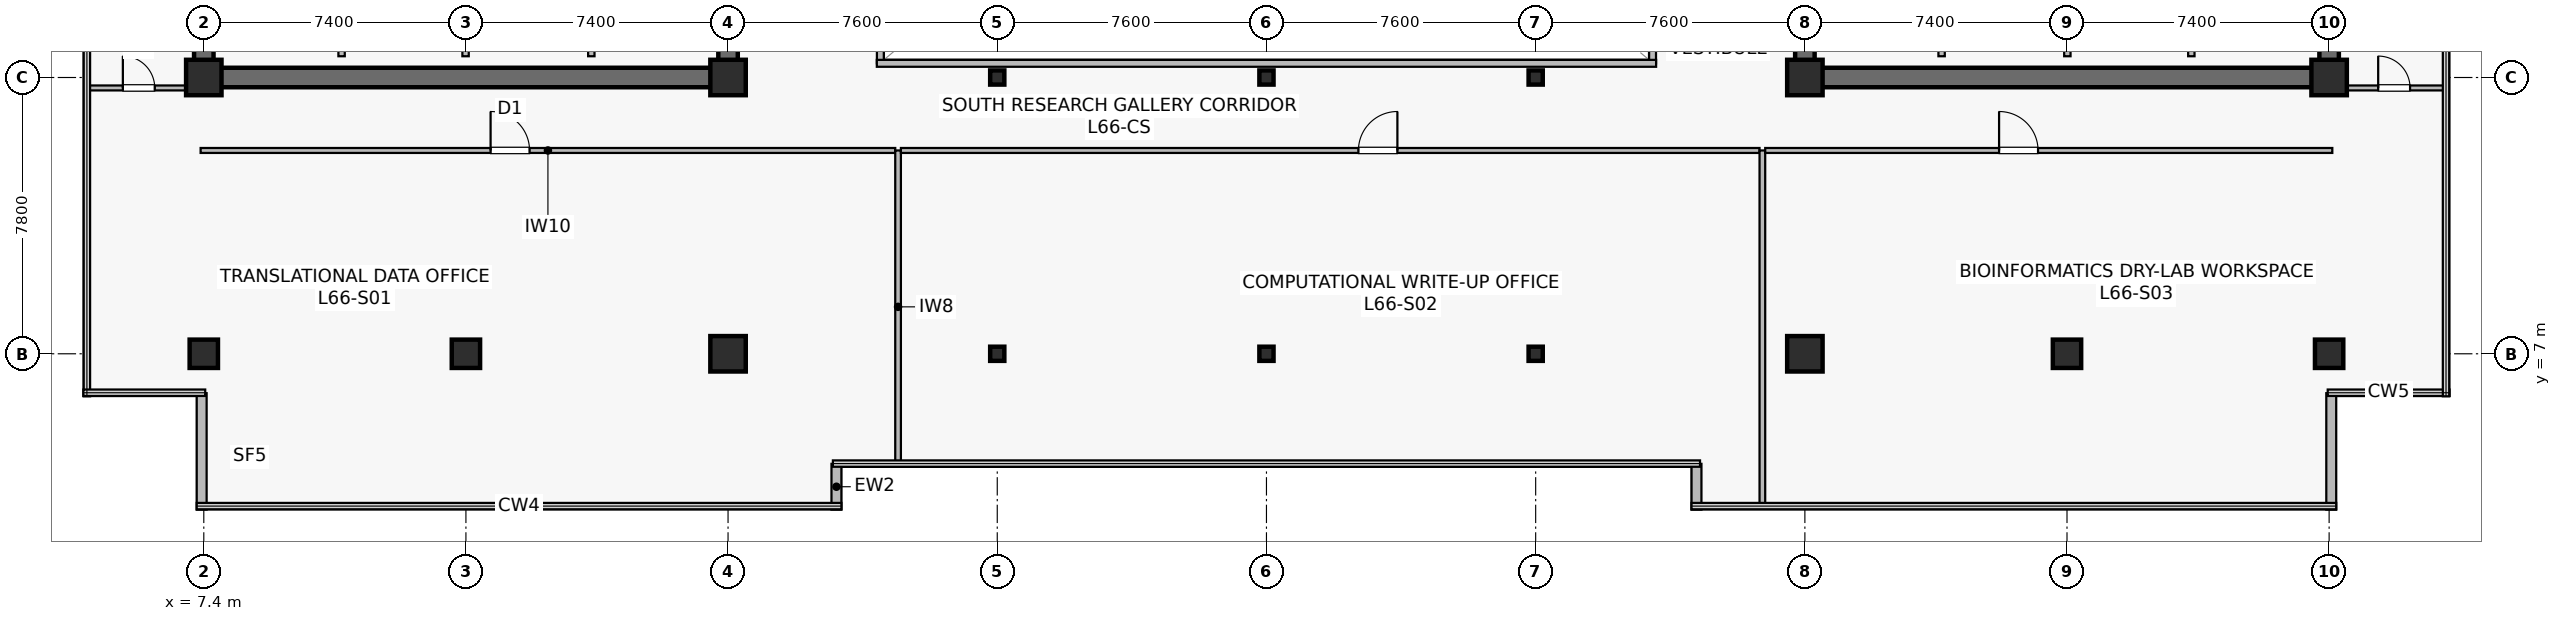
"""IFC4 building model, lengths in metres.
Left out: names, types, materials, properties, quantities, classifications, styles, units other than length and angle.
Written with IfcOpenShell. Run it as: python <this file> out.ifc"""

import sys

from ifc_helpers import new_model, si_unit, direction, frame, frame_2d, origin, origin_2d, place, context, subcontext, project, spatial, rectangle, hollow_rectangle, extrude, source, transform, mapped, element, fill, save


model = new_model("IFC4")
c1 = context("Model", 3, precision=1e-05, world=origin(), true_north=direction((0.0, 1.0)))
c2 = subcontext(c1, "Body", "Model", "MODEL_VIEW")
j1 = project(units=[si_unit("LENGTHUNIT", "METRE"), si_unit("PLANEANGLEUNIT", "RADIAN")], contexts=[c1])
p1 = place(None, origin())
s1 = spatial("IfcSite", under=j1, at=p1, CompositionType="ELEMENT")
p2 = place(p1, origin())
s2 = spatial("IfcBuilding", under=s1, at=p2, CompositionType="ELEMENT")
p3 = place(p2, frame((0.0, 0.0, 275.2)))
s3 = spatial("IfcBuildingStorey", under=s2, at=p3, CompositionType="ELEMENT", Elevation=275.2)
p4 = place(p3, frame((7.125, 14.8, 0.0), z_axis=(0.0, 0.0, 1.0), x_axis=(1.0, 0.0, 0.0)))
e1 = element("IfcWall", 1, at=p4, inside=s3, PredefinedType="SHEAR", context=c2, shape_type="SweptSolid", body=[
    extrude(rectangle(XDim=15.35, YDim=0.55, at=frame_2d((7.675, 0.0))), origin(), (0.0, 0.0, 1.0), 3.8),
])
p5 = place(p3, frame((7.4, 15.075, 0.0), z_axis=(0.0, 0.0, 1.0), x_axis=(0.0, 1.0, 0.0)))
e2 = element("IfcWall", 2, at=p5, inside=s3, PredefinedType="SHEAR", context=c2, shape_type="SweptSolid", body=[
    extrude(rectangle(XDim=18.45, YDim=0.55, at=frame_2d((9.225, 0.0))), origin(), (0.0, 0.0, 1.0), 3.8),
])
p6 = place(p3, frame((22.2, 15.075, 0.0), z_axis=(0.0, 0.0, 1.0), x_axis=(0.0, 1.0, 0.0)))
e3 = element("IfcWall", 3, at=p6, inside=s3, PredefinedType="SHEAR", context=c2, shape_type="SweptSolid", body=[
    extrude(rectangle(XDim=18.45, YDim=0.55, at=frame_2d((9.225, 0.0))), origin(), (0.0, 0.0, 1.0), 3.8),
])
p7 = place(p6, frame((3.475, 0.0, 0.0)))
e4 = element("IfcOpeningElement", 4, at=p7, cuts=e3, PredefinedType="OPENING", context=c2, shape_type="SweptSolid", body=[
    extrude(rectangle(XDim=1.42, YDim=2.2, at=frame_2d((0.71, 1.1))), frame((0.0, 0.285, 0.0), z_axis=(0.0, -1.0, 0.0), x_axis=(1.0, 0.0, 0.0)), (0.0, 0.0, 1.0), 0.57),
])
p8 = place(p3, frame((52.325, 14.8, 0.0), z_axis=(0.0, 0.0, 1.0), x_axis=(1.0, 0.0, 0.0)))
e5 = element("IfcWall", 5, at=p8, inside=s3, PredefinedType="SHEAR", context=c2, shape_type="SweptSolid", body=[
    extrude(rectangle(XDim=15.35, YDim=0.55, at=frame_2d((7.675, 0.0))), origin(), (0.0, 0.0, 1.0), 3.8),
])
p9 = place(p3, frame((52.6, 15.075, 0.0), z_axis=(0.0, 0.0, 1.0), x_axis=(0.0, 1.0, 0.0)))
e6 = element("IfcWall", 6, at=p9, inside=s3, PredefinedType="SHEAR", context=c2, shape_type="SweptSolid", body=[
    extrude(rectangle(XDim=18.45, YDim=0.55, at=frame_2d((9.225, 0.0))), origin(), (0.0, 0.0, 1.0), 3.8),
])
p10 = place(p9, frame((3.475, 0.0, 0.0)))
e7 = element("IfcOpeningElement", 7, at=p10, cuts=e6, PredefinedType="OPENING", context=c2, shape_type="SweptSolid", body=[
    extrude(rectangle(XDim=1.42, YDim=2.2, at=frame_2d((0.71, 1.1))), frame((0.0, 0.285, 0.0), z_axis=(0.0, -1.0, 0.0), x_axis=(1.0, 0.0, 0.0)), (0.0, 0.0, 1.0), 0.57),
])
p11 = place(p3, frame((67.4, 15.075, 0.0), z_axis=(0.0, 0.0, 1.0), x_axis=(0.0, 1.0, 0.0)))
e8 = element("IfcWall", 8, at=p11, inside=s3, PredefinedType="SHEAR", context=c2, shape_type="SweptSolid", body=[
    extrude(rectangle(XDim=18.45, YDim=0.55, at=frame_2d((9.225, 0.0))), origin(), (0.0, 0.0, 1.0), 3.8),
])
m1 = source(origin(), c2, "Body", "SweptSolid", [
    extrude(rectangle(XDim=0.8, YDim=0.8, at=origin_2d()), origin(), (0.0, 0.0, 1.0), 4.1),
])
p12 = place(p3, frame((14.8, 7.0, 0.0), z_axis=(0.0, 0.0, 1.0), x_axis=(1.0, 0.0, 0.0)))
e9 = element("IfcColumn", 9, at=p12, inside=s3, PredefinedType="COLUMN", context=c2, shape_type="MappedRepresentation", body=[
    mapped(m1, transform((0.0, 0.0, 0.0), scale=1.0)),
])
m2 = source(origin(), c2, "Body", "SweptSolid", [
    extrude(rectangle(XDim=1.0, YDim=1.0, at=origin_2d()), origin(), (0.0, 0.0, 1.0), 4.1),
])
for number, where, z_axis, x_axis in (
    (10, (22.2, 7.0, 0.0), (0.0, 0.0, 1.0), (1.0, 0.0, 0.0)),
    (11, (7.4, 14.8, 0.0), (0.0, 0.0, 1.0), (1.0, 0.0, 0.0)),
    (12, (22.2, 14.8, 0.0), (0.0, 0.0, 1.0), (1.0, 0.0, 0.0)),
    (13, (52.6, 7.0, 0.0), (0.0, 0.0, 1.0), (1.0, 0.0, 0.0)),
):
    element("IfcColumn", number, at=place(p3, frame(where, z_axis=z_axis, x_axis=x_axis)), inside=s3, PredefinedType="COLUMN", context=c2, shape_type="MappedRepresentation", body=[
        mapped(m2, transform((0.0, 0.0, 0.0), scale=1.0)),
    ])
p13 = place(p3, frame((60.0, 7.0, 0.0), z_axis=(0.0, 0.0, 1.0), x_axis=(1.0, 0.0, 0.0)))
e14 = element("IfcColumn", 14, at=p13, inside=s3, PredefinedType="COLUMN", context=c2, shape_type="MappedRepresentation", body=[
    mapped(m1, transform((0.0, 0.0, 0.0), scale=1.0)),
])
for number, where, z_axis, x_axis in (
    (15, (52.6, 14.8, 0.0), (0.0, 0.0, 1.0), (1.0, 0.0, 0.0)),
    (16, (67.4, 14.8, 0.0), (0.0, 0.0, 1.0), (1.0, 0.0, 0.0)),
):
    element("IfcColumn", number, at=place(p3, frame(where, z_axis=z_axis, x_axis=x_axis)), inside=s3, PredefinedType="COLUMN", context=c2, shape_type="MappedRepresentation", body=[
        mapped(m2, transform((0.0, 0.0, 0.0), scale=1.0)),
    ])
for number, where, z_axis, x_axis in (
    (17, (7.4, 7.0, 0.0), (0.0, 0.0, 1.0), (1.0, 0.0, 0.0)),
    (18, (67.4, 7.0, 0.0), (0.0, 0.0, 1.0), (1.0, 0.0, 0.0)),
):
    element("IfcColumn", number, at=place(p3, frame(where, z_axis=z_axis, x_axis=x_axis)), inside=s3, PredefinedType="COLUMN", context=c2, shape_type="MappedRepresentation", body=[
        mapped(m1, transform((0.0, 0.0, 0.0), scale=1.0)),
    ])
m3 = source(origin(), c2, "Body", "SweptSolid", [
    extrude(hollow_rectangle(XDim=0.4, YDim=0.4, WallThickness=0.019, at=origin_2d()), origin(), (0.0, 0.0, 1.0), 4.1),
])
for number, where, z_axis, x_axis in (
    (19, (29.8, 7.0, 0.0), (0.0, 0.0, 1.0), (1.0, 0.0, 0.0)),
    (20, (29.8, 14.8, 0.0), (0.0, 0.0, 1.0), (1.0, 0.0, 0.0)),
    (21, (37.4, 7.0, 0.0), (0.0, 0.0, 1.0), (1.0, 0.0, 0.0)),
    (22, (37.4, 14.8, 0.0), (0.0, 0.0, 1.0), (1.0, 0.0, 0.0)),
    (23, (45.0, 7.0, 0.0), (0.0, 0.0, 1.0), (1.0, 0.0, 0.0)),
    (24, (45.0, 14.8, 0.0), (0.0, 0.0, 1.0), (1.0, 0.0, 0.0)),
):
    element("IfcColumn", number, at=place(p3, frame(where, z_axis=z_axis, x_axis=x_axis)), inside=s3, PredefinedType="COLUMN", context=c2, shape_type="MappedRepresentation", body=[
        mapped(m3, transform((0.0, 0.0, 0.0), scale=1.0)),
    ])
for number, where, z_axis, x_axis in (
    (25, (25.26, 2.6, 0.0), (0.0, 0.0, 1.0), (0.0, 1.0, 0.0)),
    (26, (49.54, 3.893, 0.0), (0.0, 0.0, 1.0), (0.0, -1.0, 0.0)),
):
    element("IfcWall", number, at=place(p3, frame(where, z_axis=z_axis, x_axis=x_axis)), inside=s3, PredefinedType="STANDARD", context=c2, shape_type="SweptSolid", body=[
        extrude(rectangle(XDim=1.293, YDim=0.28, at=frame_2d((0.646, 0.0))), origin(), (0.0, 0.0, 1.0), 3.8),
    ])
for number, where, z_axis, x_axis in (
    (27, (67.46, 2.6, 0.0), (0.0, 0.0, 1.0), (0.0, 1.0, 0.0)),
    (28, (7.34, 5.888, 0.0), (0.0, 0.0, 1.0), (0.0, -1.0, 0.0)),
):
    element("IfcWall", number, at=place(p3, frame(where, z_axis=z_axis, x_axis=x_axis)), inside=s3, PredefinedType="STANDARD", context=c2, shape_type="SweptSolid", body=[
        extrude(rectangle(XDim=3.288, YDim=0.28, at=frame_2d((1.644, 0.0))), origin(), (0.0, 0.0, 1.0), 3.8),
    ])
p14 = place(p3, frame((11.29, 15.4, 0.0), z_axis=(0.0, 0.0, 1.0), x_axis=(0.0, 1.0, 0.0)))
e29 = element("IfcWall", 29, at=p14, inside=s3, PredefinedType="SOLIDWALL", context=c2, shape_type="SweptSolid", body=[
    extrude(rectangle(XDim=2.4, YDim=0.18, at=frame_2d((1.2, 0.0))), origin(), (0.0, 0.0, 1.0), 3.8),
])
p15 = place(p3, frame((14.79, 15.4, 0.0), z_axis=(0.0, 0.0, 1.0), x_axis=(0.0, 1.0, 0.0)))
e30 = element("IfcWall", 30, at=p15, inside=s3, PredefinedType="SOLIDWALL", context=c2, shape_type="SweptSolid", body=[
    extrude(rectangle(XDim=2.4, YDim=0.18, at=frame_2d((1.2, 0.0))), origin(), (0.0, 0.0, 1.0), 3.197),
])
for number, where, z_axis, x_axis in (
    (31, (18.34, 15.4, 0.0), (0.0, 0.0, 1.0), (0.0, 1.0, 0.0)),
    (32, (63.51, 15.4, 0.0), (0.0, 0.0, 1.0), (0.0, 1.0, 0.0)),
):
    element("IfcWall", number, at=place(p3, frame(where, z_axis=z_axis, x_axis=x_axis)), inside=s3, PredefinedType="SOLIDWALL", context=c2, shape_type="SweptSolid", body=[
        extrude(rectangle(XDim=2.4, YDim=0.18, at=frame_2d((1.2, 0.0))), origin(), (0.0, 0.0, 1.0), 3.8),
    ])
p16 = place(p3, frame((60.01, 15.4, 0.0), z_axis=(0.0, 0.0, 1.0), x_axis=(0.0, 1.0, 0.0)))
e33 = element("IfcWall", 33, at=p16, inside=s3, PredefinedType="SOLIDWALL", context=c2, shape_type="SweptSolid", body=[
    extrude(rectangle(XDim=2.4, YDim=0.18, at=frame_2d((1.2, 0.0))), origin(), (0.0, 0.0, 1.0), 3.197),
])
p17 = place(p3, frame((56.46, 15.4, 0.0), z_axis=(0.0, 0.0, 1.0), x_axis=(0.0, 1.0, 0.0)))
e34 = element("IfcWall", 34, at=p17, inside=s3, PredefinedType="SOLIDWALL", context=c2, shape_type="SweptSolid", body=[
    extrude(rectangle(XDim=2.4, YDim=0.18, at=frame_2d((1.2, 0.0))), origin(), (0.0, 0.0, 1.0), 3.8),
])
p18 = place(p3, frame((26.5, 15.2, 0.0), z_axis=(0.0, 0.0, 1.0), x_axis=(0.0, 1.0, 0.0)))
e35 = element("IfcWall", 35, at=p18, inside=s3, PredefinedType="SOLIDWALL", context=c2, shape_type="SweptSolid", body=[
    extrude(rectangle(XDim=18.2, YDim=0.195, at=frame_2d((9.1, 0.0))), origin(), (0.0, 0.0, 1.0), 3.8),
])
p19 = place(p18, frame((1.8, 0.0, 0.9)))
e36 = element("IfcOpeningElement", 36, at=p19, cuts=e35, PredefinedType="OPENING", context=c2, shape_type="SweptSolid", body=[
    extrude(rectangle(XDim=1.5, YDim=1.4, at=frame_2d((0.75, 0.7))), frame((0.0, 0.107, 0.0), z_axis=(0.0, -1.0, 0.0), x_axis=(1.0, 0.0, 0.0)), (0.0, 0.0, 1.0), 0.215),
])
p20 = place(p18, frame((13.2, 0.0, 0.9)))
e37 = element("IfcOpeningElement", 37, at=p20, cuts=e35, PredefinedType="OPENING", context=c2, shape_type="SweptSolid", body=[
    extrude(rectangle(XDim=1.5, YDim=1.4, at=frame_2d((0.75, 0.7))), frame((0.0, 0.107, 0.0), z_axis=(0.0, -1.0, 0.0), x_axis=(1.0, 0.0, 0.0)), (0.0, 0.0, 1.0), 0.215),
])
p21 = place(p3, frame((48.3, 15.2, 0.0), z_axis=(0.0, 0.0, 1.0), x_axis=(0.0, 1.0, 0.0)))
e38 = element("IfcWall", 38, at=p21, inside=s3, PredefinedType="SOLIDWALL", context=c2, shape_type="SweptSolid", body=[
    extrude(rectangle(XDim=18.2, YDim=0.195, at=frame_2d((9.1, 0.0))), origin(), (0.0, 0.0, 1.0), 3.8),
])
p22 = place(p21, frame((1.8, 0.0, 0.9)))
e39 = element("IfcOpeningElement", 39, at=p22, cuts=e38, PredefinedType="OPENING", context=c2, shape_type="SweptSolid", body=[
    extrude(rectangle(XDim=1.5, YDim=1.4, at=frame_2d((0.75, 0.7))), frame((0.0, 0.107, 0.0), z_axis=(0.0, -1.0, 0.0), x_axis=(1.0, 0.0, 0.0)), (0.0, 0.0, 1.0), 0.215),
])
p23 = place(p21, frame((13.2, 0.0, 0.9)))
e40 = element("IfcOpeningElement", 40, at=p23, cuts=e38, PredefinedType="OPENING", context=c2, shape_type="SweptSolid", body=[
    extrude(rectangle(XDim=1.5, YDim=1.4, at=frame_2d((0.75, 0.7))), frame((0.0, 0.107, 0.0), z_axis=(0.0, -1.0, 0.0), x_axis=(1.0, 0.0, 0.0)), (0.0, 0.0, 1.0), 0.215),
])
p24 = place(p3, frame((26.4, 15.2, 0.0), z_axis=(0.0, 0.0, 1.0), x_axis=(1.0, 0.0, 0.0)))
e41 = element("IfcWall", 41, at=p24, inside=s3, PredefinedType="SOLIDWALL", context=c2, shape_type="SweptSolid", body=[
    extrude(rectangle(XDim=22.0, YDim=0.195, at=frame_2d((11.0, 0.0))), origin(), (0.0, 0.0, 1.0), 3.8),
])
p25 = place(p3, frame((7.31, 12.74, 0.0), z_axis=(0.0, 0.0, 1.0), x_axis=(1.0, 0.0, 0.0)))
e42 = element("IfcWall", 42, at=p25, inside=s3, PredefinedType="PARTITIONING", context=c2, shape_type="SweptSolid", body=[
    extrude(rectangle(XDim=19.61, YDim=0.14, at=frame_2d((9.805, 0.0))), origin(), (0.0, 0.0, 1.0), 3.197),
])
p26 = place(p25, frame((8.186, 0.0, 0.0)))
e43 = element("IfcOpeningElement", 43, at=p26, cuts=e42, PredefinedType="OPENING", context=c2, shape_type="SweptSolid", body=[
    extrude(rectangle(XDim=1.1, YDim=2.18, at=frame_2d((0.55, 1.09))), frame((0.0, 0.08, 0.0), z_axis=(0.0, -1.0, 0.0), x_axis=(1.0, 0.0, 0.0)), (0.0, 0.0, 1.0), 0.16),
])
p27 = place(p3, frame((27.0, 3.91, 0.0), z_axis=(0.0, 0.0, 1.0), x_axis=(0.0, 1.0, 0.0)))
e44 = element("IfcWall", 44, at=p27, inside=s3, PredefinedType="PARTITIONING", context=c2, shape_type="SweptSolid", body=[
    extrude(rectangle(XDim=8.83, YDim=0.16, at=frame_2d((4.415, 0.0))), origin(), (0.0, 0.0, 1.0), 3.135),
])
p28 = place(p3, frame((27.08, 12.74, 0.0), z_axis=(0.0, 0.0, 1.0), x_axis=(1.0, 0.0, 0.0)))
e45 = element("IfcWall", 45, at=p28, inside=s3, PredefinedType="PARTITIONING", context=c2, shape_type="SweptSolid", body=[
    extrude(rectangle(XDim=24.24, YDim=0.14, at=frame_2d((12.12, 0.0))), origin(), (0.0, 0.0, 1.0), 3.197),
])
p29 = place(p28, frame((12.917, 0.0, 0.0)))
e46 = element("IfcOpeningElement", 46, at=p29, cuts=e45, PredefinedType="OPENING", context=c2, shape_type="SweptSolid", body=[
    extrude(rectangle(XDim=1.1, YDim=2.18, at=frame_2d((0.55, 1.09))), frame((0.0, 0.08, 0.0), z_axis=(0.0, -1.0, 0.0), x_axis=(1.0, 0.0, 0.0)), (0.0, 0.0, 1.0), 0.16),
])
p30 = place(p3, frame((51.4, 2.71, 0.0), z_axis=(0.0, 0.0, 1.0), x_axis=(0.0, 1.0, 0.0)))
e47 = element("IfcWall", 47, at=p30, inside=s3, PredefinedType="PARTITIONING", context=c2, shape_type="SweptSolid", body=[
    extrude(rectangle(XDim=10.03, YDim=0.16, at=frame_2d((5.015, 0.0))), origin(), (0.0, 0.0, 1.0), 3.135),
])
p31 = place(p3, frame((51.48, 12.74, 0.0), z_axis=(0.0, 0.0, 1.0), x_axis=(1.0, 0.0, 0.0)))
e48 = element("IfcWall", 48, at=p31, inside=s3, PredefinedType="PARTITIONING", context=c2, shape_type="SweptSolid", body=[
    extrude(rectangle(XDim=16.01, YDim=0.14, at=frame_2d((8.005, 0.0))), origin(), (0.0, 0.0, 1.0), 3.197),
])
p32 = place(p31, frame((6.602, 0.0, 0.0)))
e49 = element("IfcOpeningElement", 49, at=p32, cuts=e48, PredefinedType="OPENING", context=c2, shape_type="SweptSolid", body=[
    extrude(rectangle(XDim=1.1, YDim=2.18, at=frame_2d((0.55, 1.09))), frame((0.0, 0.08, 0.0), z_axis=(0.0, -1.0, 0.0), x_axis=(1.0, 0.0, 0.0)), (0.0, 0.0, 1.0), 0.16),
])
p33 = place(p3, frame((4.11, 14.505, 0.0), z_axis=(0.0, 0.0, 1.0), x_axis=(1.0, 0.0, 0.0)))
e50 = element("IfcWall", 50, at=p33, inside=s3, PredefinedType="PARTITIONING", context=c2, shape_type="SweptSolid", body=[
    extrude(rectangle(XDim=2.91, YDim=0.14, at=frame_2d((1.455, 0.0))), origin(), (0.0, 0.0, 1.0), 3.8),
])
p34 = place(p33, frame((1.005, 0.0, 0.0)))
e51 = element("IfcOpeningElement", 51, at=p34, cuts=e50, PredefinedType="OPENING", context=c2, shape_type="SweptSolid", body=[
    extrude(rectangle(XDim=0.9, YDim=2.1, at=frame_2d((0.45, 1.05))), frame((0.0, 0.08, 0.0), z_axis=(0.0, -1.0, 0.0), x_axis=(1.0, 0.0, 0.0)), (0.0, 0.0, 1.0), 0.16),
])
p35 = place(p3, frame((67.78, 14.505, 0.0), z_axis=(0.0, 0.0, 1.0), x_axis=(1.0, 0.0, 0.0)))
e52 = element("IfcWall", 52, at=p35, inside=s3, PredefinedType="PARTITIONING", context=c2, shape_type="SweptSolid", body=[
    extrude(rectangle(XDim=2.91, YDim=0.14, at=frame_2d((1.455, 0.0))), origin(), (0.0, 0.0, 1.0), 3.8),
])
p36 = place(p35, frame((1.005, 0.0, 0.0)))
e53 = element("IfcOpeningElement", 53, at=p36, cuts=e52, PredefinedType="OPENING", context=c2, shape_type="SweptSolid", body=[
    extrude(rectangle(XDim=0.9, YDim=2.1, at=frame_2d((0.45, 1.05))), frame((0.0, 0.08, 0.0), z_axis=(0.0, -1.0, 0.0), x_axis=(1.0, 0.0, 0.0)), (0.0, 0.0, 1.0), 0.16),
])
m4 = source(origin(), c2, "Body", "SweptSolid", [
    extrude(rectangle(XDim=1.1, YDim=2.18, at=frame_2d((0.55, 1.09))), frame((0.0, 0.025, 0.0), z_axis=(0.0, -1.0, 0.0), x_axis=(1.0, 0.0, 0.0)), (0.0, 0.0, 1.0), 0.05),
])
p37 = place(p26, origin())
e54 = element("IfcDoor", 54, at=p37, inside=s3, OperationType="SINGLE_SWING_LEFT", PredefinedType="DOOR", context=c2, shape_type="MappedRepresentation", body=[
    mapped(m4, transform((0.0, 0.0, 0.0), scale=1.0)),
])
fill(e43, e54)
p38 = place(p29, origin())
e55 = element("IfcDoor", 55, at=p38, inside=s3, OperationType="SINGLE_SWING_RIGHT", PredefinedType="DOOR", context=c2, shape_type="MappedRepresentation", body=[
    mapped(m4, transform((0.0, 0.0, 0.0), scale=1.0)),
])
fill(e46, e55)
p39 = place(p32, origin())
e56 = element("IfcDoor", 56, at=p39, inside=s3, OperationType="SINGLE_SWING_LEFT", PredefinedType="DOOR", context=c2, shape_type="MappedRepresentation", body=[
    mapped(m4, transform((0.0, 0.0, 0.0), scale=1.0)),
])
fill(e49, e56)
m5 = source(origin(), c2, "Body", "SweptSolid", [
    extrude(rectangle(XDim=0.9, YDim=2.1, at=frame_2d((0.45, 1.05))), frame((0.0, 0.025, 0.0), z_axis=(0.0, -1.0, 0.0), x_axis=(1.0, 0.0, 0.0)), (0.0, 0.0, 1.0), 0.05),
])
p40 = place(p34, origin())
e57 = element("IfcDoor", 57, at=p40, inside=s3, OperationType="SINGLE_SWING_LEFT", PredefinedType="DOOR", context=c2, shape_type="MappedRepresentation", body=[
    mapped(m5, transform((0.0, 0.0, 0.0), scale=1.0)),
])
fill(e51, e57)
p41 = place(p36, origin())
e58 = element("IfcDoor", 58, at=p41, inside=s3, OperationType="SINGLE_SWING_LEFT", PredefinedType="DOOR", context=c2, shape_type="MappedRepresentation", body=[
    mapped(m5, transform((0.0, 0.0, 0.0), scale=1.0)),
])
fill(e53, e58)
save(model, sys.argv[1])
